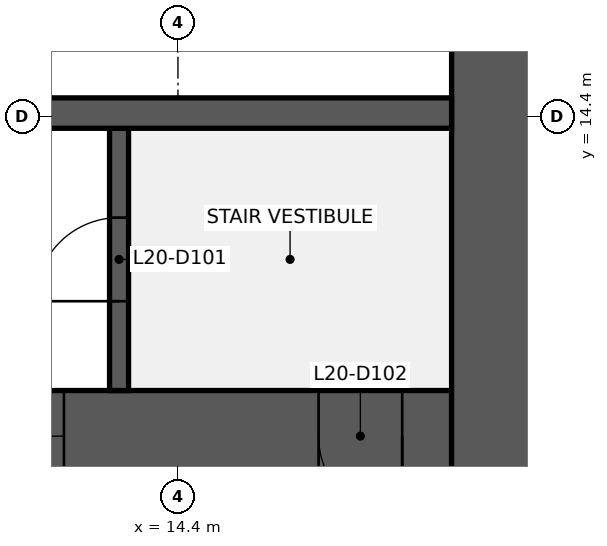
"""IFC4 building model, lengths in metres.
Left out: names, types, materials, properties, quantities, classifications, styles, units other than length and angle.
Written with IfcOpenShell. Run it as: python <this file> out.ifc"""

import sys

from ifc_helpers import new_model, si_unit, direction, frame, frame_2d, origin, place, context, subcontext, project, spatial, rectangle, extrude, element, fill, save


model = new_model("IFC4")
c1 = context("Model", 3, precision=1e-05, world=origin(), true_north=direction((0.0, 1.0)))
c2 = subcontext(c1, "Body", "Model", "MODEL_VIEW")
j1 = project(units=[si_unit("LENGTHUNIT", "METRE"), si_unit("PLANEANGLEUNIT", "RADIAN")], contexts=[c1])
p1 = place(None, origin())
s1 = spatial("IfcSite", under=j1, at=p1, CompositionType="ELEMENT")
p2 = place(p1, origin())
s2 = spatial("IfcBuilding", under=s1, at=p2, CompositionType="ELEMENT")
p3 = place(p2, frame((0.0, 0.0, 91.5)))
s3 = spatial("IfcBuildingStorey", under=s2, at=p3, CompositionType="ELEMENT", Elevation=91.5)
p4 = place(p3, frame((18.0, 10.2, 0.0), z_axis=(0.0, 0.0, 1.0), x_axis=(-1.0, 0.0, 0.0)))
e1 = element("IfcWall", 1, at=p4, inside=s3, PredefinedType="SHEAR", context=c2, shape_type="SweptSolid", body=[
    extrude(rectangle(XDim=16.8, YDim=1.2, at=frame_2d((8.4, 0.0))), origin(), (0.0, 0.0, 1.0), 12.3),
])
p5 = place(p4, frame((0.65, 0.0, 0.0)))
e2 = element("IfcOpeningElement", 2, at=p5, cuts=e1, PredefinedType="OPENING", context=c2, shape_type="SweptSolid", body=[
    extrude(rectangle(XDim=1.1, YDim=2.1, at=frame_2d((0.55, 1.05))), frame((0.0, 0.61, 0.0), z_axis=(0.0, -1.0, 0.0), x_axis=(1.0, 0.0, 0.0)), (0.0, 0.0, 1.0), 1.22),
])
p6 = place(p4, frame((9.9, 0.0, 0.9)))
e3 = element("IfcOpeningElement", 3, at=p6, cuts=e1, PredefinedType="OPENING", context=c2, shape_type="SweptSolid", body=[
    extrude(rectangle(XDim=1.8, YDim=1.5, at=frame_2d((0.9, 0.75))), frame((0.0, 0.61, 0.0), z_axis=(0.0, -1.0, 0.0), x_axis=(1.0, 0.0, 0.0)), (0.0, 0.0, 1.0), 1.22),
])
p7 = place(p4, frame((5.1, 0.0, 0.9)))
e4 = element("IfcOpeningElement", 4, at=p7, cuts=e1, PredefinedType="OPENING", context=c2, shape_type="SweptSolid", body=[
    extrude(rectangle(XDim=1.8, YDim=1.5, at=frame_2d((0.9, 0.75))), frame((0.0, 0.61, 0.0), z_axis=(0.0, -1.0, 0.0), x_axis=(1.0, 0.0, 0.0)), (0.0, 0.0, 1.0), 1.22),
])
p8 = place(p3, frame((18.6, 38.4, 0.0), z_axis=(0.0, 0.0, 1.0), x_axis=(0.0, -1.0, 0.0)))
e5 = element("IfcWall", 5, at=p8, inside=s3, PredefinedType="SHEAR", context=c2, shape_type="SweptSolid", body=[
    extrude(rectangle(XDim=28.8, YDim=1.2, at=frame_2d((14.4, 0.0))), origin(), (0.0, 0.0, 1.0), 12.3),
])
p9 = place(p8, frame((18.3, 0.0, 0.0)))
e6 = element("IfcOpeningElement", 6, at=p9, cuts=e5, PredefinedType="OPENING", context=c2, shape_type="SweptSolid", body=[
    extrude(rectangle(XDim=1.8, YDim=2.1, at=frame_2d((0.9, 1.05))), frame((0.0, 0.61, 0.0), z_axis=(0.0, -1.0, 0.0), x_axis=(1.0, 0.0, 0.0)), (0.0, 0.0, 1.0), 1.22),
])
p10 = place(p8, frame((8.7, 0.0, 0.0)))
e7 = element("IfcOpeningElement", 7, at=p10, cuts=e5, PredefinedType="OPENING", context=c2, shape_type="SweptSolid", body=[
    extrude(rectangle(XDim=1.8, YDim=2.1, at=frame_2d((0.9, 1.05))), frame((0.0, 0.61, 0.0), z_axis=(0.0, -1.0, 0.0), x_axis=(1.0, 0.0, 0.0)), (0.0, 0.0, 1.0), 1.22),
])
p11 = place(p3, frame((13.625, 10.8, 0.0), z_axis=(0.0, 0.0, 1.0), x_axis=(0.0, 1.0, 0.0)))
e8 = element("IfcWall", 8, at=p11, inside=s3, PredefinedType="SHEAR", context=c2, shape_type="SweptSolid", body=[
    extrude(rectangle(XDim=3.45, YDim=0.25, at=frame_2d((1.725, 0.0))), origin(), (0.0, 0.0, 1.0), 12.3),
])
p12 = place(p11, frame((1.175, 0.0, 0.0)))
e9 = element("IfcOpeningElement", 9, at=p12, cuts=e8, PredefinedType="OPENING", context=c2, shape_type="SweptSolid", body=[
    extrude(rectangle(XDim=1.1, YDim=2.1, at=frame_2d((0.55, 1.05))), frame((0.0, 0.135, 0.0), z_axis=(0.0, -1.0, 0.0), x_axis=(1.0, 0.0, 0.0)), (0.0, 0.0, 1.0), 0.27),
])
p13 = place(p3, frame((1.2, 14.45, 0.0), z_axis=(0.0, 0.0, 1.0), x_axis=(1.0, 0.0, 0.0)))
e10 = element("IfcWall", 10, at=p13, inside=s3, PredefinedType="SHEAR", context=c2, shape_type="SweptSolid", body=[
    extrude(rectangle(XDim=16.8, YDim=0.4, at=frame_2d((8.4, 0.0))), origin(), (0.0, 0.0, 1.0), 12.3),
])
p14 = place(p12, origin())
e11 = element("IfcDoor", 11, at=p14, inside=s3, OperationType="SINGLE_SWING_LEFT", PredefinedType="DOOR", context=c2, shape_type="SweptSolid", body=[
    extrude(rectangle(XDim=1.1, YDim=2.1, at=frame_2d((0.55, 1.05))), frame((0.0, 0.025, 0.0), z_axis=(0.0, -1.0, 0.0), x_axis=(1.0, 0.0, 0.0)), (0.0, 0.0, 1.0), 0.05),
])
fill(e9, e11)
p15 = place(p5, origin())
e12 = element("IfcDoor", 12, at=p15, inside=s3, OperationType="SINGLE_SWING_LEFT", PredefinedType="DOOR", context=c2, shape_type="SweptSolid", body=[
    extrude(rectangle(XDim=1.1, YDim=2.1, at=frame_2d((0.55, 1.05))), frame((0.0, 0.025, 0.0), z_axis=(0.0, -1.0, 0.0), x_axis=(1.0, 0.0, 0.0)), (0.0, 0.0, 1.0), 0.05),
])
fill(e2, e12)
p16 = place(p7, origin())
e13 = element("IfcWindow", 13, at=p16, inside=s3, PartitioningType="SINGLE_PANEL", PredefinedType="WINDOW", context=c2, shape_type="SweptSolid", body=[
    extrude(rectangle(XDim=1.8, YDim=1.5, at=frame_2d((0.9, 0.75))), frame((0.0, 0.03, 0.0), z_axis=(0.0, -1.0, 0.0), x_axis=(1.0, 0.0, 0.0)), (0.0, 0.0, 1.0), 0.06),
])
fill(e4, e13)
save(model, sys.argv[1])
